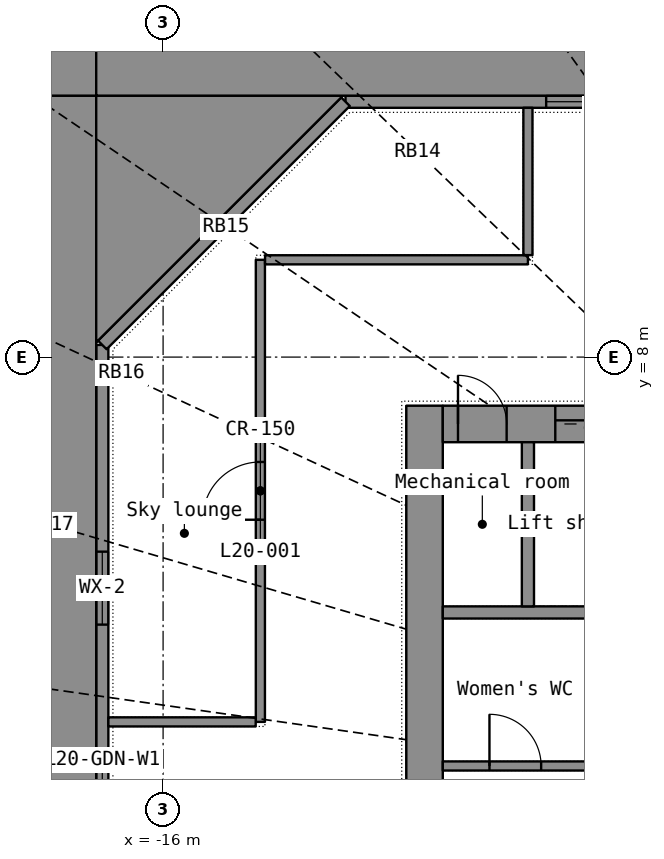
"""IFC4 building model, lengths in metres.
Left out: names, types, materials, properties, quantities, classifications, styles, units other than length and angle.
Written with IfcOpenShell. Run it as: python <this file> out.ifc"""

import sys

from ifc_helpers import new_model, si_unit, direction, frame, frame_2d, origin, place, context, subcontext, project, spatial, polyline, rectangle, outline, extrude, element, fill, save


model = new_model("IFC4")
c1 = context("Model", 3, precision=1e-05, world=origin(), true_north=direction((0.0, 1.0)))
c2 = subcontext(c1, "Body", "Model", "MODEL_VIEW")
j1 = project(units=[si_unit("LENGTHUNIT", "METRE"), si_unit("PLANEANGLEUNIT", "RADIAN")], contexts=[c1])
p1 = place(None, origin())
s1 = spatial("IfcSite", under=j1, at=p1, CompositionType="ELEMENT")
p2 = place(p1, origin())
s2 = spatial("IfcBuilding", under=s1, at=p2, CompositionType="ELEMENT")
p3 = place(p2, frame((0.0, 0.0, 85.2)))
s3 = spatial("IfcBuildingStorey", under=s2, at=p3, CompositionType="ELEMENT", Elevation=85.2)
p4 = place(p3, frame((-13.0, 12.2, 0.08), z_axis=(0.0, 0.0, 1.0), x_axis=(1.0, 0.0, 0.0)))
e1 = element("IfcWall", 1, at=p4, inside=s3, PredefinedType="STANDARD", context=c2, shape_type="SweptSolid", body=[
    extrude(rectangle(XDim=26.0, YDim=0.2, at=frame_2d((13.0, 0.0))), origin(), (0.0, 0.0, 1.0), 7.12),
])
p5 = place(p4, frame((7.1, 0.0, 0.0)))
e2 = element("IfcOpeningElement", 2, at=p5, cuts=e1, PredefinedType="OPENING", context=c2, shape_type="SweptSolid", body=[
    extrude(rectangle(XDim=1.8, YDim=2.4, at=frame_2d((0.9, 1.2))), frame((0.0, 0.11, 0.0), z_axis=(0.0, -1.0, 0.0), x_axis=(1.0, 0.0, 0.0)), (0.0, 0.0, 1.0), 0.22),
])
p6 = place(p4, frame((17.1, 0.0, 0.0)))
e3 = element("IfcOpeningElement", 3, at=p6, cuts=e1, PredefinedType="OPENING", context=c2, shape_type="SweptSolid", body=[
    extrude(rectangle(XDim=1.8, YDim=2.4, at=frame_2d((0.9, 1.2))), frame((0.0, 0.11, 0.0), z_axis=(0.0, -1.0, 0.0), x_axis=(1.0, 0.0, 0.0)), (0.0, 0.0, 1.0), 0.22),
])
p7 = place(p4, frame((3.3, 0.0, 0.9)))
e4 = element("IfcOpeningElement", 4, at=p7, cuts=e1, PredefinedType="OPENING", context=c2, shape_type="SweptSolid", body=[
    extrude(rectangle(XDim=2.4, YDim=1.5, at=frame_2d((1.2, 0.75))), frame((0.0, 0.11, 0.0), z_axis=(0.0, -1.0, 0.0), x_axis=(1.0, 0.0, 0.0)), (0.0, 0.0, 1.0), 0.22),
])
p8 = place(p4, frame((11.8, 0.0, 0.9)))
e5 = element("IfcOpeningElement", 5, at=p8, cuts=e1, PredefinedType="OPENING", context=c2, shape_type="SweptSolid", body=[
    extrude(rectangle(XDim=2.4, YDim=1.5, at=frame_2d((1.2, 0.75))), frame((0.0, 0.11, 0.0), z_axis=(0.0, -1.0, 0.0), x_axis=(1.0, 0.0, 0.0)), (0.0, 0.0, 1.0), 0.22),
])
p9 = place(p4, frame((20.3, 0.0, 0.9)))
e6 = element("IfcOpeningElement", 6, at=p9, cuts=e1, PredefinedType="OPENING", context=c2, shape_type="SweptSolid", body=[
    extrude(rectangle(XDim=2.4, YDim=1.5, at=frame_2d((1.2, 0.75))), frame((0.0, 0.11, 0.0), z_axis=(0.0, -1.0, 0.0), x_axis=(1.0, 0.0, 0.0)), (0.0, 0.0, 1.0), 0.22),
])
p10 = place(p4, frame((6.5, 0.0, 3.2)))
e7 = element("IfcOpeningElement", 7, at=p10, cuts=e1, PredefinedType="OPENING", context=c2, shape_type="SweptSolid", body=[
    extrude(rectangle(XDim=3.0, YDim=1.0, at=frame_2d((1.5, 0.5))), frame((0.0, 0.11, 0.0), z_axis=(0.0, -1.0, 0.0), x_axis=(1.0, 0.0, 0.0)), (0.0, 0.0, 1.0), 0.22),
])
p11 = place(p4, frame((16.5, 0.0, 3.2)))
e8 = element("IfcOpeningElement", 8, at=p11, cuts=e1, PredefinedType="OPENING", context=c2, shape_type="SweptSolid", body=[
    extrude(rectangle(XDim=3.0, YDim=1.0, at=frame_2d((1.5, 0.5))), frame((0.0, 0.11, 0.0), z_axis=(0.0, -1.0, 0.0), x_axis=(1.0, 0.0, 0.0)), (0.0, 0.0, 1.0), 0.22),
])
p12 = place(p3, frame((-17.0, -8.2, 0.08), z_axis=(0.0, 0.0, 1.0), x_axis=(0.0, 1.0, 0.0)))
e9 = element("IfcWall", 9, at=p12, inside=s3, PredefinedType="STANDARD", context=c2, shape_type="SweptSolid", body=[
    extrude(rectangle(XDim=16.4, YDim=0.2, at=frame_2d((8.2, 0.0))), origin(), (0.0, 0.0, 1.0), 7.12),
])
p13 = place(p12, frame((7.3, 0.0, 0.0)))
e10 = element("IfcOpeningElement", 10, at=p13, cuts=e9, PredefinedType="OPENING", context=c2, shape_type="SweptSolid", body=[
    extrude(rectangle(XDim=1.8, YDim=2.4, at=frame_2d((0.9, 1.2))), frame((0.0, 0.11, 0.0), z_axis=(0.0, -1.0, 0.0), x_axis=(1.0, 0.0, 0.0)), (0.0, 0.0, 1.0), 0.22),
])
p14 = place(p12, frame((3.4, 0.0, 0.1)))
e11 = element("IfcOpeningElement", 11, at=p14, cuts=e9, PredefinedType="OPENING", context=c2, shape_type="SweptSolid", body=[
    extrude(rectangle(XDim=1.2, YDim=2.2, at=frame_2d((0.6, 1.1))), frame((0.0, 0.11, 0.0), z_axis=(0.0, -1.0, 0.0), x_axis=(1.0, 0.0, 0.0)), (0.0, 0.0, 1.0), 0.22),
])
p15 = place(p12, frame((11.8, 0.0, 0.1)))
e12 = element("IfcOpeningElement", 12, at=p15, cuts=e9, PredefinedType="OPENING", context=c2, shape_type="SweptSolid", body=[
    extrude(rectangle(XDim=1.2, YDim=2.2, at=frame_2d((0.6, 1.1))), frame((0.0, 0.11, 0.0), z_axis=(0.0, -1.0, 0.0), x_axis=(1.0, 0.0, 0.0)), (0.0, 0.0, 1.0), 0.22),
])
p16 = place(p3, frame((-17.0, 8.2, 0.08), z_axis=(0.0, 0.0, 1.0), x_axis=(0.707106781, 0.707106781, 0.0)))
e13 = element("IfcWall", 13, at=p16, inside=s3, PredefinedType="STANDARD", context=c2, shape_type="SweptSolid", body=[
    extrude(rectangle(XDim=5.657, YDim=0.2, at=frame_2d((2.828, 0.0))), origin(), (0.0, 0.0, 1.0), 7.12),
])
p17 = place(p3, frame((0.0, 0.0, -0.4)))
e14 = element("IfcWall", 14, at=p17, inside=s3, PredefinedType="ELEMENTEDWALL", context=c2, shape_type="SweptSolid", body=[
    extrude(outline(polyline([(-25.125, 2.764), (-25.283, 1.794), (-25.32, 1.1), (-24.393, 1.1), (-24.393, 0.9), (-17.1, 0.9), (-17.1, 8.241), (-17.1, 12.3), (-20.321, 12.3), (-20.79, 11.804), (-21.14, 11.358), (-21.031, 11.358), (-21.031, 9.158), (-22.706, 9.158), (-23.001, 8.698), (-23.409, 7.901), (-23.409, 6.275), (-24.146, 6.275), (-24.515, 5.327), (-24.75, 4.464), (-24.557, 4.464), (-24.557, 2.764), (-25.125, 2.764)])), origin(), (0.0, 0.0, 1.0), 1.58),
])
p18 = place(p3, frame((0.0, 0.0, -0.4)))
e15 = element("IfcWall", 15, at=p18, inside=s3, PredefinedType="ELEMENTEDWALL", context=c2, shape_type="SweptSolid", body=[
    extrude(outline(polyline([(-13.042, 12.3), (-17.1, 12.3), (-17.1, 8.241), (-13.042, 12.3)])), origin(), (0.0, 0.0, 1.0), 1.58),
])
p19 = place(p3, frame((0.0, 0.0, -0.4)))
e16 = element("IfcWall", 16, at=p19, inside=s3, PredefinedType="ELEMENTEDWALL", context=c2, shape_type="SweptSolid", body=[
    extrude(outline(polyline([(-20.321, 12.3), (-17.1, 12.3), (-17.1, 15.177), (-17.105, 15.177), (-17.946, 14.553), (-18.963, 13.653), (-18.963, 12.579), (-20.056, 12.579), (-20.321, 12.3)])), origin(), (0.0, 0.0, 1.0), 1.58),
])
p20 = place(p3, frame((0.0, 0.0, -0.4)))
e17 = element("IfcWall", 17, at=p20, inside=s3, PredefinedType="ELEMENTEDWALL", context=c2, shape_type="SweptSolid", body=[
    extrude(outline(polyline([(-17.1, 15.177), (-17.1, 12.3), (-13.042, 12.3), (-5.9, 12.3), (-5.9, 20.0), (-6.569, 19.879), (-8.017, 19.509), (-8.017, 18.853), (-9.717, 18.853), (-9.717, 18.991), (-10.726, 18.652), (-11.726, 18.23), (-11.726, 16.77), (-13.927, 16.77), (-13.927, 17.184), (-14.557, 16.859), (-15.791, 16.091), (-15.791, 15.177), (-17.1, 15.177)])), origin(), (0.0, 0.0, 1.0), 1.58),
])
p21 = place(p3, frame((-11.7, -7.2, 0.0), z_axis=(0.0, 0.0, 1.0), x_axis=(0.0, 1.0, 0.0)))
e18 = element("IfcWall", 18, at=p21, inside=s3, PredefinedType="SHEAR", context=c2, shape_type="SweptSolid", body=[
    extrude(rectangle(XDim=14.4, YDim=0.6, at=frame_2d((7.2, 0.0))), origin(), (0.0, 0.0, 1.0), 7.0),
])
p22 = place(p21, frame((6.5, 0.0, 0.0)))
e19 = element("IfcOpeningElement", 19, at=p22, cuts=e18, PredefinedType="OPENING", context=c2, shape_type="SweptSolid", body=[
    extrude(rectangle(XDim=1.4, YDim=2.2, at=frame_2d((0.7, 1.1))), frame((0.0, 0.31, 0.0), z_axis=(0.0, -1.0, 0.0), x_axis=(1.0, 0.0, 0.0)), (0.0, 0.0, 1.0), 0.62),
])
p23 = place(p3, frame((-11.4, 6.9, 0.0), z_axis=(0.0, 0.0, 1.0), x_axis=(1.0, 0.0, 0.0)))
e20 = element("IfcWall", 20, at=p23, inside=s3, PredefinedType="SHEAR", context=c2, shape_type="SweptSolid", body=[
    extrude(rectangle(XDim=22.8, YDim=0.6, at=frame_2d((11.4, 0.0))), origin(), (0.0, 0.0, 1.0), 7.0),
])
p24 = place(p23, frame((1.85, 0.0, 0.0)))
e21 = element("IfcOpeningElement", 21, at=p24, cuts=e20, PredefinedType="OPENING", context=c2, shape_type="SweptSolid", body=[
    extrude(rectangle(XDim=1.1, YDim=2.2, at=frame_2d((0.55, 1.1))), frame((0.0, 0.31, 0.0), z_axis=(0.0, -1.0, 0.0), x_axis=(1.0, 0.0, 0.0)), (0.0, 0.0, 1.0), 0.62),
])
p25 = place(p23, frame((7.95, 0.0, 0.0)))
e22 = element("IfcOpeningElement", 22, at=p25, cuts=e20, PredefinedType="OPENING", context=c2, shape_type="SweptSolid", body=[
    extrude(rectangle(XDim=0.9, YDim=2.1, at=frame_2d((0.45, 1.05))), frame((0.0, 0.31, 0.0), z_axis=(0.0, -1.0, 0.0), x_axis=(1.0, 0.0, 0.0)), (0.0, 0.0, 1.0), 0.62),
])
p26 = place(p23, frame((15.95, 0.0, 0.0)))
e23 = element("IfcOpeningElement", 23, at=p26, cuts=e20, PredefinedType="OPENING", context=c2, shape_type="SweptSolid", body=[
    extrude(rectangle(XDim=0.9, YDim=2.1, at=frame_2d((0.45, 1.05))), frame((0.0, 0.31, 0.0), z_axis=(0.0, -1.0, 0.0), x_axis=(1.0, 0.0, 0.0)), (0.0, 0.0, 1.0), 0.62),
])
p27 = place(p23, frame((0.25, 0.0, 0.0)))
e24 = element("IfcOpeningElement", 24, at=p27, cuts=e20, PredefinedType="OPENING", context=c2, shape_type="SweptSolid", body=[
    extrude(rectangle(XDim=0.8, YDim=2.05, at=frame_2d((0.4, 1.025))), frame((0.0, 0.31, 0.0), z_axis=(0.0, -1.0, 0.0), x_axis=(1.0, 0.0, 0.0)), (0.0, 0.0, 1.0), 0.62),
])
p28 = place(p23, frame((21.75, 0.0, 0.0)))
e25 = element("IfcOpeningElement", 25, at=p28, cuts=e20, PredefinedType="OPENING", context=c2, shape_type="SweptSolid", body=[
    extrude(rectangle(XDim=0.8, YDim=2.05, at=frame_2d((0.4, 1.025))), frame((0.0, 0.31, 0.0), z_axis=(0.0, -1.0, 0.0), x_axis=(1.0, 0.0, 0.0)), (0.0, 0.0, 1.0), 0.62),
])
p29 = place(p3, frame((-11.4, 3.8, 0.0), z_axis=(0.0, 0.0, 1.0), x_axis=(1.0, 0.0, 0.0)))
e26 = element("IfcWall", 26, at=p29, inside=s3, PredefinedType="SHEAR", context=c2, shape_type="SweptSolid", body=[
    extrude(rectangle(XDim=22.8, YDim=0.2, at=frame_2d((11.4, 0.0))), origin(), (0.0, 0.0, 1.0), 7.0),
])
p30 = place(p3, frame((-10.0, 3.9, 0.0), z_axis=(0.0, 0.0, 1.0), x_axis=(0.0, 1.0, 0.0)))
e27 = element("IfcWall", 27, at=p30, inside=s3, PredefinedType="SHEAR", context=c2, shape_type="SweptSolid", body=[
    extrude(rectangle(XDim=2.7, YDim=0.2, at=frame_2d((1.35, 0.0))), origin(), (0.0, 0.0, 1.0), 7.0),
])
p31 = place(p3, frame((-11.4, 1.275, 0.0), z_axis=(0.0, 0.0, 1.0), x_axis=(1.0, 0.0, 0.0)))
e28 = element("IfcWall", 28, at=p31, inside=s3, PredefinedType="PARTITIONING", context=c2, shape_type="SweptSolid", body=[
    extrude(rectangle(XDim=8.4, YDim=0.15, at=frame_2d((4.2, 0.0))), origin(), (0.0, 0.0, 1.0), 7.0),
])
p32 = place(p31, frame((0.768, 0.0, 0.0)))
e29 = element("IfcOpeningElement", 29, at=p32, cuts=e28, PredefinedType="OPENING", context=c2, shape_type="SweptSolid", body=[
    extrude(rectangle(XDim=0.85, YDim=2.1, at=frame_2d((0.425, 1.05))), frame((0.0, 0.085, 0.0), z_axis=(0.0, -1.0, 0.0), x_axis=(1.0, 0.0, 0.0)), (0.0, 0.0, 1.0), 0.17),
])
p33 = place(p31, frame((3.302, 0.0, 0.0)))
e30 = element("IfcOpeningElement", 30, at=p33, cuts=e28, PredefinedType="OPENING", context=c2, shape_type="SweptSolid", body=[
    extrude(rectangle(XDim=0.85, YDim=2.1, at=frame_2d((0.425, 1.05))), frame((0.0, 0.085, 0.0), z_axis=(0.0, -1.0, 0.0), x_axis=(1.0, 0.0, 0.0)), (0.0, 0.0, 1.0), 0.17),
])
p34 = place(p31, frame((5.415, 0.0, 0.0)))
e31 = element("IfcOpeningElement", 31, at=p34, cuts=e28, PredefinedType="OPENING", context=c2, shape_type="SweptSolid", body=[
    extrude(rectangle(XDim=0.9, YDim=2.1, at=frame_2d((0.45, 1.05))), frame((0.0, 0.085, 0.0), z_axis=(0.0, -1.0, 0.0), x_axis=(1.0, 0.0, 0.0)), (0.0, 0.0, 1.0), 0.17),
])
p35 = place(p31, frame((7.155, 0.0, 0.0)))
e32 = element("IfcOpeningElement", 32, at=p35, cuts=e28, PredefinedType="OPENING", context=c2, shape_type="SweptSolid", body=[
    extrude(rectangle(XDim=0.9, YDim=2.1, at=frame_2d((0.45, 1.05))), frame((0.0, 0.085, 0.0), z_axis=(0.0, -1.0, 0.0), x_axis=(1.0, 0.0, 0.0)), (0.0, 0.0, 1.0), 0.17),
])
p36 = place(p3, frame((-14.4, 2.0, 0.0), z_axis=(0.0, 0.0, 1.0), x_axis=(0.0, 1.0, 0.0)))
e33 = element("IfcWall", 33, at=p36, inside=s3, PredefinedType="PARTITIONING", context=c2, shape_type="SweptSolid", body=[
    extrude(rectangle(XDim=7.6, YDim=0.15, at=frame_2d((3.8, 0.0))), origin(), (0.0, 0.0, 1.0), 6.1),
])
p37 = place(p36, frame((3.325, 0.0, 0.0)))
e34 = element("IfcOpeningElement", 34, at=p37, cuts=e33, PredefinedType="OPENING", context=c2, shape_type="SweptSolid", body=[
    extrude(rectangle(XDim=0.95, YDim=2.15, at=frame_2d((0.475, 1.075))), frame((0.0, 0.085, 0.0), z_axis=(0.0, -1.0, 0.0), x_axis=(1.0, 0.0, 0.0)), (0.0, 0.0, 1.0), 0.17),
])
p38 = place(p3, frame((-14.323, 9.6, 0.0), z_axis=(0.0, 0.0, 1.0), x_axis=(1.0, 0.0, 0.0)))
e35 = element("IfcWall", 35, at=p38, inside=s3, PredefinedType="PARTITIONING", context=c2, shape_type="SweptSolid", body=[
    extrude(rectangle(XDim=4.323, YDim=0.15, at=frame_2d((2.162, 0.0))), origin(), (0.0, 0.0, 1.0), 6.1),
])
p39 = place(p3, frame((-10.0, 9.677, 0.0), z_axis=(0.0, 0.0, 1.0), x_axis=(0.0, 1.0, 0.0)))
e36 = element("IfcWall", 36, at=p39, inside=s3, PredefinedType="PARTITIONING", context=c2, shape_type="SweptSolid", body=[
    extrude(rectangle(XDim=2.423, YDim=0.15, at=frame_2d((1.211, 0.0))), origin(), (0.0, 0.0, 1.0), 6.1),
])
p40 = place(p3, frame((-16.9, 2.0, 0.0), z_axis=(0.0, 0.0, 1.0), x_axis=(1.0, 0.0, 0.0)))
e37 = element("IfcWall", 37, at=p40, inside=s3, PredefinedType="PARTITIONING", context=c2, shape_type="SweptSolid", body=[
    extrude(rectangle(XDim=2.423, YDim=0.15, at=frame_2d((1.211, 0.0))), origin(), (0.0, 0.0, 1.0), 6.1),
])
p41 = place(p7, origin())
e38 = element("IfcWindow", 38, at=p41, inside=s3, PartitioningType="SINGLE_PANEL", PredefinedType="WINDOW", context=c2, shape_type="SweptSolid", body=[
    extrude(rectangle(XDim=2.4, YDim=1.5, at=frame_2d((1.2, 0.75))), frame((0.0, 0.03, 0.0), z_axis=(0.0, -1.0, 0.0), x_axis=(1.0, 0.0, 0.0)), (0.0, 0.0, 1.0), 0.06),
])
fill(e4, e38)
p42 = place(p15, origin())
e39 = element("IfcWindow", 39, at=p42, inside=s3, PartitioningType="SINGLE_PANEL", PredefinedType="WINDOW", context=c2, shape_type="SweptSolid", body=[
    extrude(rectangle(XDim=1.2, YDim=2.2, at=frame_2d((0.6, 1.1))), frame((0.0, 0.03, 0.0), z_axis=(0.0, -1.0, 0.0), x_axis=(1.0, 0.0, 0.0)), (0.0, 0.0, 1.0), 0.06),
])
fill(e12, e39)
p43 = place(p24, origin())
e40 = element("IfcDoor", 40, at=p43, inside=s3, OperationType="DOUBLE_DOOR_SLIDING", PredefinedType="DOOR", context=c2, shape_type="SweptSolid", body=[
    extrude(rectangle(XDim=1.1, YDim=2.2, at=frame_2d((0.55, 1.1))), frame((0.0, 0.025, 0.0), z_axis=(0.0, -1.0, 0.0), x_axis=(1.0, 0.0, 0.0)), (0.0, 0.0, 1.0), 0.05),
])
fill(e21, e40)
p44 = place(p27, origin())
e41 = element("IfcDoor", 41, at=p44, inside=s3, OperationType="SINGLE_SWING_LEFT", PredefinedType="DOOR", context=c2, shape_type="SweptSolid", body=[
    extrude(rectangle(XDim=0.8, YDim=2.05, at=frame_2d((0.4, 1.025))), frame((0.0, 0.025, 0.0), z_axis=(0.0, -1.0, 0.0), x_axis=(1.0, 0.0, 0.0)), (0.0, 0.0, 1.0), 0.05),
])
fill(e24, e41)
p45 = place(p32, origin())
e42 = element("IfcDoor", 42, at=p45, inside=s3, OperationType="SINGLE_SWING_LEFT", PredefinedType="DOOR", context=c2, shape_type="SweptSolid", body=[
    extrude(rectangle(XDim=0.85, YDim=2.1, at=frame_2d((0.425, 1.05))), frame((0.0, 0.025, 0.0), z_axis=(0.0, -1.0, 0.0), x_axis=(1.0, 0.0, 0.0)), (0.0, 0.0, 1.0), 0.05),
])
fill(e29, e42)
p46 = place(p37, origin())
e43 = element("IfcDoor", 43, at=p46, inside=s3, OperationType="SINGLE_SWING_LEFT", PredefinedType="DOOR", context=c2, shape_type="SweptSolid", body=[
    extrude(rectangle(XDim=0.95, YDim=2.15, at=frame_2d((0.475, 1.075))), frame((0.0, 0.025, 0.0), z_axis=(0.0, -1.0, 0.0), x_axis=(1.0, 0.0, 0.0)), (0.0, 0.0, 1.0), 0.05),
])
fill(e34, e43)
save(model, sys.argv[1])
